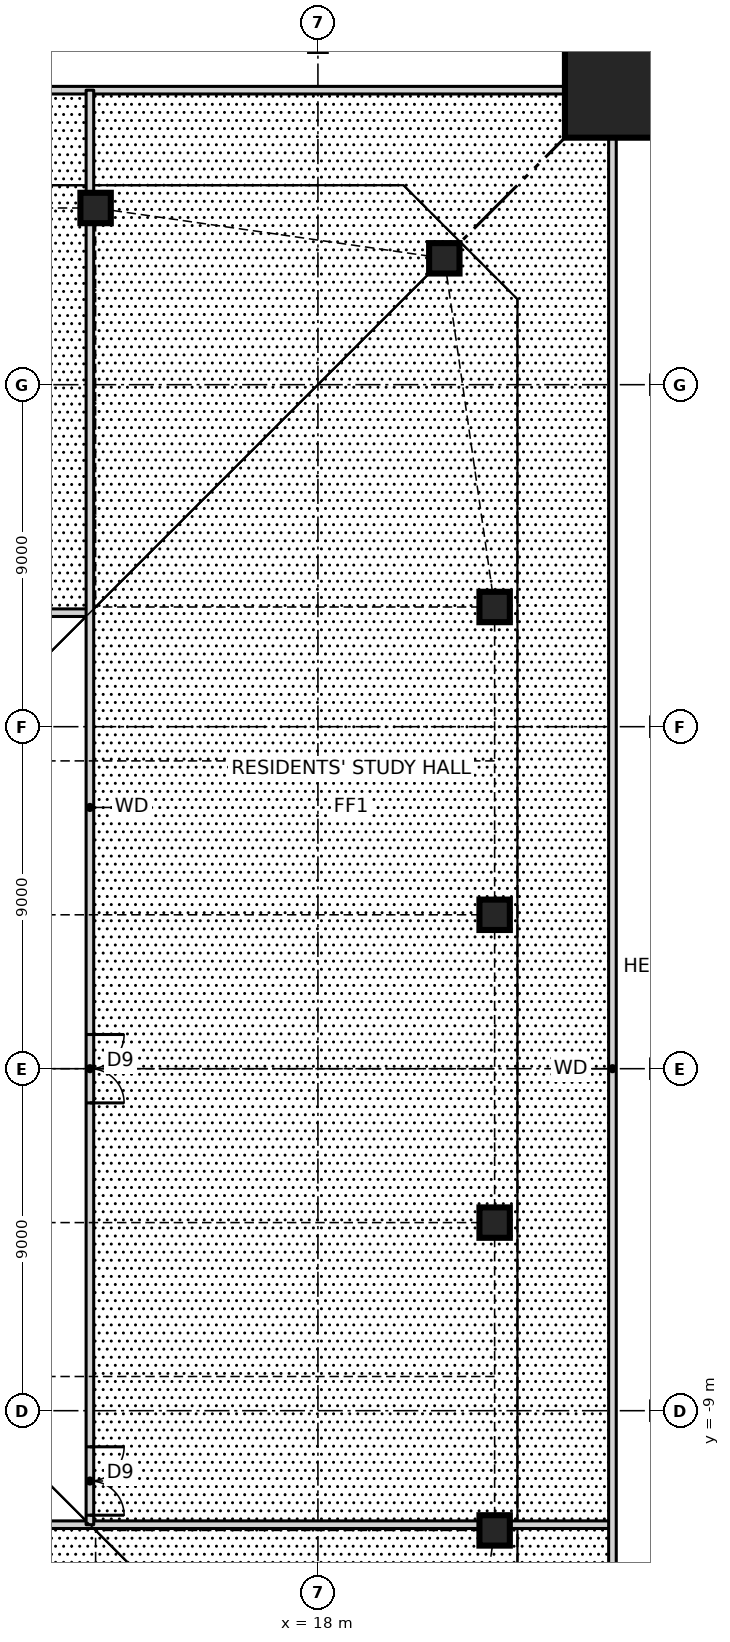
"""IFC4 building model, lengths in metres.
Left out: names, types, materials, properties, quantities, classifications, styles, units other than length and angle.
Written with IfcOpenShell. Run it as: python <this file> out.ifc"""

import sys

from ifc_helpers import new_model, si_unit, direction, frame, frame_2d, origin, origin_2d, place, context, subcontext, project, spatial, rectangle, hollow_rectangle, i_section, extrude, element, fill, save


model = new_model("IFC4")
c1 = context("Model", 3, precision=1e-05, world=origin(), true_north=direction((0.0, 1.0)))
c2 = subcontext(c1, "Body", "Model", "MODEL_VIEW")
j1 = project(units=[si_unit("LENGTHUNIT", "METRE"), si_unit("PLANEANGLEUNIT", "RADIAN")], contexts=[c1])
p1 = place(None, origin())
s1 = spatial("IfcSite", under=j1, at=p1, CompositionType="ELEMENT")
p2 = place(p1, origin())
s2 = spatial("IfcBuilding", under=s1, at=p2, CompositionType="ELEMENT")
p3 = place(p2, frame((0.0, 0.0, 10.5)))
s3 = spatial("IfcBuildingStorey", under=s2, at=p3, CompositionType="ELEMENT", Elevation=10.5)
for number, where, z_axis, x_axis in (
    (1, (22.65, -12.15, 0.0), (0.0, 0.0, 1.0), (1.0, 0.0, 0.0)),
    (2, (22.65, -4.05, 0.0), (0.0, 0.0, 1.0), (1.0, 0.0, 0.0)),
    (3, (22.65, 4.05, 0.0), (0.0, 0.0, 1.0), (1.0, 0.0, 0.0)),
    (4, (22.65, 12.15, 0.0), (0.0, 0.0, 1.0), (1.0, 0.0, 0.0)),
    (5, (21.326, 21.326, 0.0), (0.0, 0.0, 1.0), (1.0, 0.0, 0.0)),
    (6, (12.15, 22.65, 0.0), (0.0, 0.0, 1.0), (1.0, 0.0, 0.0)),
):
    element("IfcColumn", number, at=place(p3, frame(where, z_axis=z_axis, x_axis=x_axis)), inside=s3, PredefinedType="COLUMN", context=c2, shape_type="SweptSolid", body=[
        extrude(hollow_rectangle(XDim=0.8, YDim=0.8, WallThickness=0.09, at=origin_2d()), origin(), (0.0, 0.0, 1.0), 4.5),
    ])
p4 = place(p3, frame((27.0, 27.0, 0.0), z_axis=(0.0, 0.0, 1.0), x_axis=(1.0, 0.0, 0.0)))
e7 = element("IfcColumn", 7, at=p4, inside=s3, PredefinedType="COLUMN", context=c2, shape_type="SweptSolid", body=[
    extrude(rectangle(XDim=5.0, YDim=5.0, at=origin_2d()), origin(), (0.0, 0.0, 1.0), 4.5),
    extrude(i_section(OverallWidth=0.478, OverallDepth=0.599, WebThickness=0.1, FlangeThickness=0.14, at=origin_2d()), origin(), (0.0, 0.0, 1.0), 4.5),
])
p5 = place(p3, frame((-12.0, -12.0, 0.0), z_axis=(0.0, 0.0, 1.0), x_axis=(1.0, 0.0, 0.0)))
e8 = element("IfcWall", 8, at=p5, inside=s3, PredefinedType="SOLIDWALL", context=c2, shape_type="SweptSolid", body=[
    extrude(rectangle(XDim=37.75, YDim=0.2, at=frame_2d((18.875, 0.0))), origin(), (0.0, 0.0, 1.0), 4.25),
])
p6 = place(p5, frame((10.1, 0.0, 0.0)))
e9 = element("IfcOpeningElement", 9, at=p6, cuts=e8, PredefinedType="OPENING", context=c2, shape_type="SweptSolid", body=[
    extrude(rectangle(XDim=1.8, YDim=2.1, at=frame_2d((0.9, 1.05))), frame((0.0, 0.11, 0.0), z_axis=(0.0, -1.0, 0.0), x_axis=(1.0, 0.0, 0.0)), (0.0, 0.0, 1.0), 0.22),
])
p7 = place(p3, frame((-25.75, 12.0, 0.0), z_axis=(0.0, 0.0, 1.0), x_axis=(1.0, 0.0, 0.0)))
e10 = element("IfcWall", 10, at=p7, inside=s3, PredefinedType="SOLIDWALL", context=c2, shape_type="SweptSolid", body=[
    extrude(rectangle(XDim=37.75, YDim=0.2, at=frame_2d((18.875, 0.0))), origin(), (0.0, 0.0, 1.0), 4.25),
])
p8 = place(p7, frame((25.85, 0.0, 0.0)))
e11 = element("IfcOpeningElement", 11, at=p8, cuts=e10, PredefinedType="OPENING", context=c2, shape_type="SweptSolid", body=[
    extrude(rectangle(XDim=1.8, YDim=2.1, at=frame_2d((0.9, 1.05))), frame((0.0, 0.11, 0.0), z_axis=(0.0, -1.0, 0.0), x_axis=(1.0, 0.0, 0.0)), (0.0, 0.0, 1.0), 0.22),
])
for number, where, z_axis, x_axis in (
    (12, (-25.75, 25.75, 0.0), (0.0, 0.0, 1.0), (1.0, 0.0, 0.0)),
    (13, (25.75, -25.75, 0.0), (0.0, 0.0, 1.0), (0.0, 1.0, 0.0)),
):
    element("IfcWall", number, at=place(p3, frame(where, z_axis=z_axis, x_axis=x_axis)), inside=s3, PredefinedType="SOLIDWALL", context=c2, shape_type="SweptSolid", body=[
        extrude(rectangle(XDim=51.5, YDim=0.2, at=frame_2d((25.75, 0.0))), origin(), (0.0, 0.0, 1.0), 4.25),
    ])
p9 = place(p3, frame((12.0, -12.0, 0.0), z_axis=(0.0, 0.0, 1.0), x_axis=(0.0, 1.0, 0.0)))
e14 = element("IfcWall", 14, at=p9, inside=s3, PredefinedType="SOLIDWALL", context=c2, shape_type="SweptSolid", body=[
    extrude(rectangle(XDim=37.75, YDim=0.2, at=frame_2d((18.875, 0.0))), origin(), (0.0, 0.0, 1.0), 4.25),
])
p10 = place(p9, frame((11.1, 0.0, 0.0)))
e15 = element("IfcOpeningElement", 15, at=p10, cuts=e14, PredefinedType="OPENING", context=c2, shape_type="SweptSolid", body=[
    extrude(rectangle(XDim=1.8, YDim=2.1, at=frame_2d((0.9, 1.05))), frame((0.0, 0.11, 0.0), z_axis=(0.0, -1.0, 0.0), x_axis=(1.0, 0.0, 0.0)), (0.0, 0.0, 1.0), 0.22),
])
p11 = place(p9, frame((0.25, 0.0, 0.0)))
e16 = element("IfcOpeningElement", 16, at=p11, cuts=e14, PredefinedType="OPENING", context=c2, shape_type="SweptSolid", body=[
    extrude(rectangle(XDim=1.8, YDim=2.1, at=frame_2d((0.9, 1.05))), frame((0.0, 0.11, 0.0), z_axis=(0.0, -1.0, 0.0), x_axis=(1.0, 0.0, 0.0)), (0.0, 0.0, 1.0), 0.22),
])
p12 = place(p10, frame((1.8, 0.0, 0.0), z_axis=(0.0, 0.0, 1.0), x_axis=(-1.0, 0.0, 0.0)))
e17 = element("IfcDoor", 17, at=p12, inside=s3, OperationType="DOUBLE_DOOR_SINGLE_SWING", PredefinedType="DOOR", context=c2, shape_type="SweptSolid", body=[
    extrude(rectangle(XDim=1.8, YDim=2.1, at=frame_2d((0.9, 1.05))), frame((0.0, 0.025, 0.0), z_axis=(0.0, -1.0, 0.0), x_axis=(1.0, 0.0, 0.0)), (0.0, 0.0, 1.0), 0.05),
])
fill(e15, e17)
p13 = place(p11, frame((1.8, 0.0, 0.0), z_axis=(0.0, 0.0, 1.0), x_axis=(-1.0, 0.0, 0.0)))
e18 = element("IfcDoor", 18, at=p13, inside=s3, OperationType="DOUBLE_DOOR_SINGLE_SWING", PredefinedType="DOOR", context=c2, shape_type="SweptSolid", body=[
    extrude(rectangle(XDim=1.8, YDim=2.1, at=frame_2d((0.9, 1.05))), frame((0.0, 0.025, 0.0), z_axis=(0.0, -1.0, 0.0), x_axis=(1.0, 0.0, 0.0)), (0.0, 0.0, 1.0), 0.05),
])
fill(e16, e18)
save(model, sys.argv[1])
